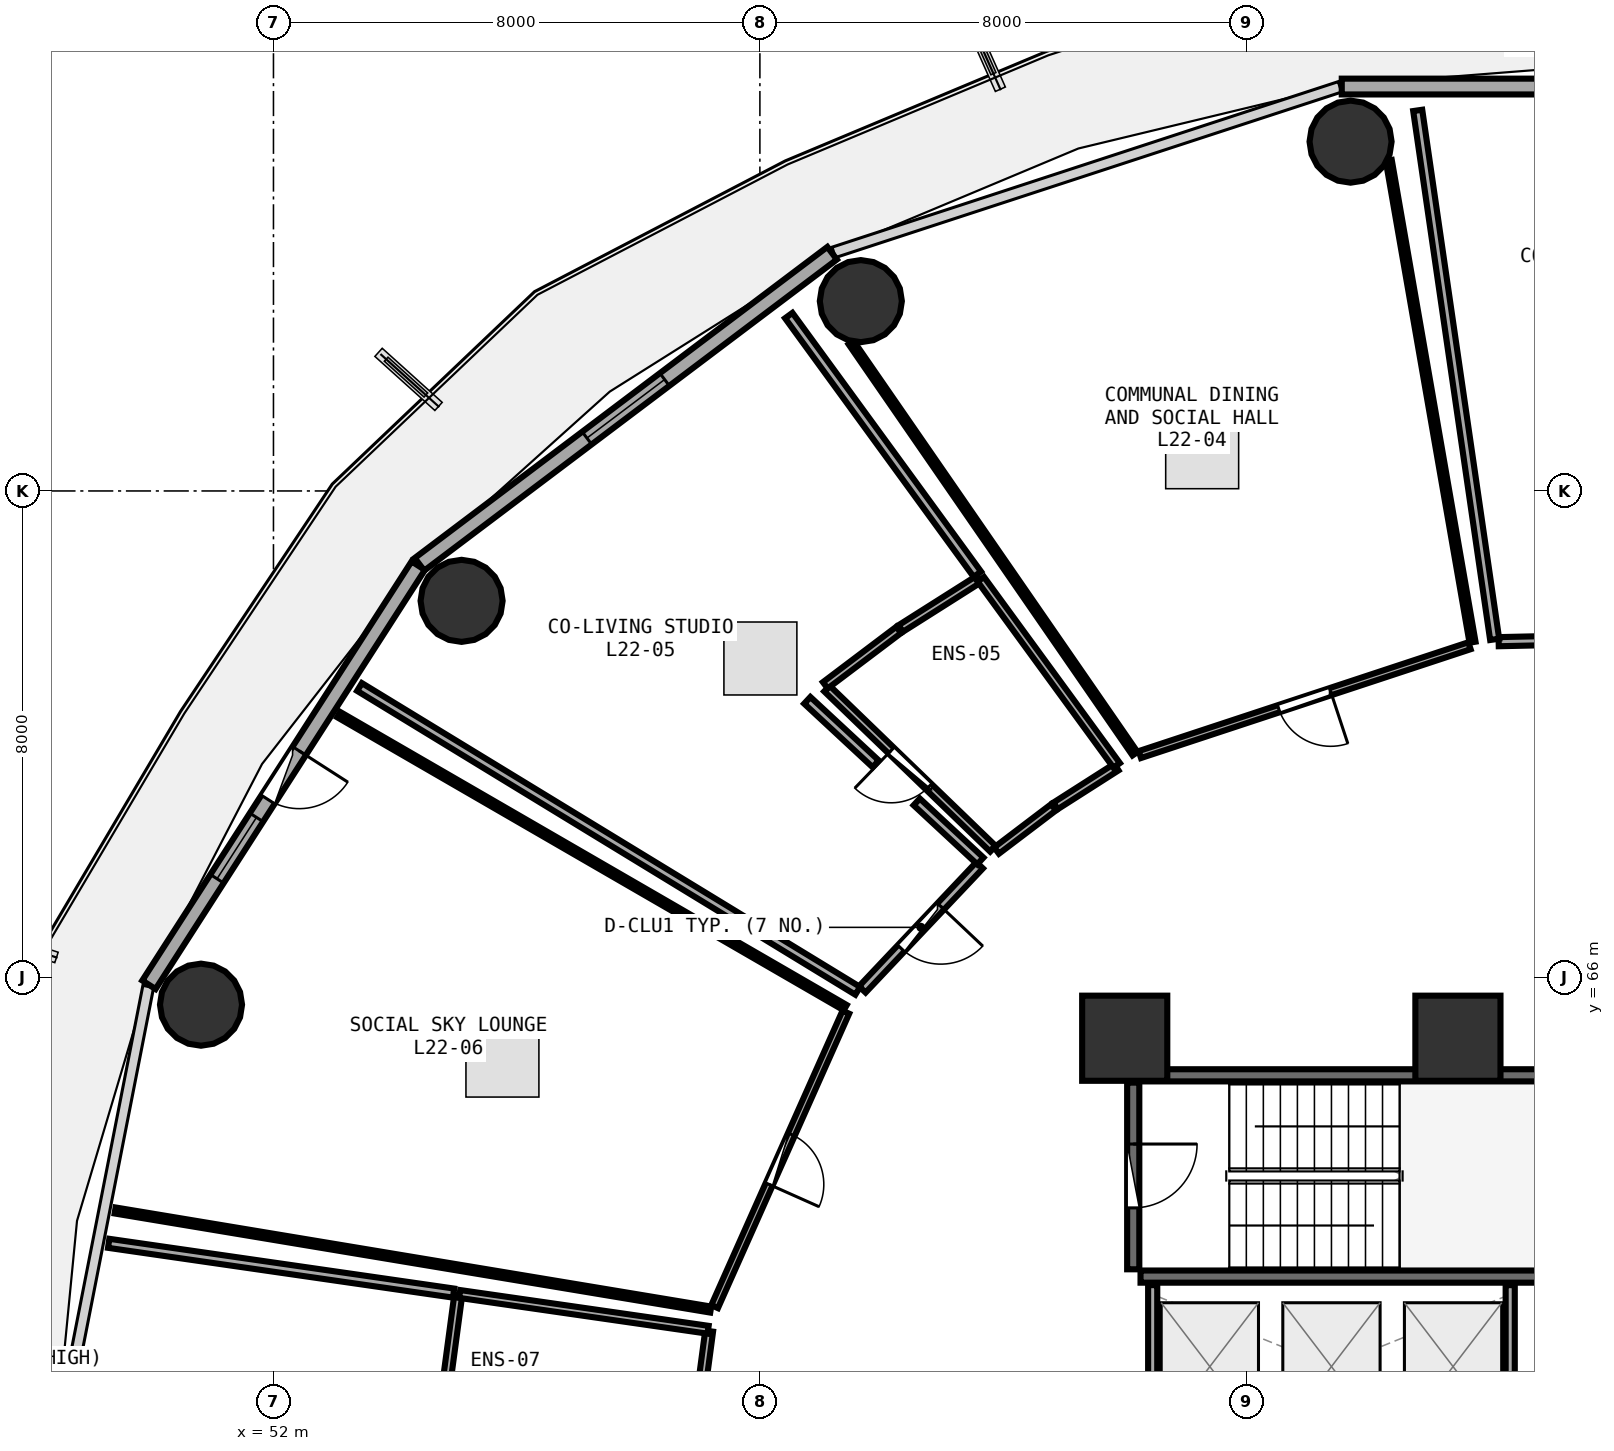
"""IFC4 building model, lengths in metres.
Left out: names, types, materials, properties, quantities, classifications, styles, units other than length and angle.
Written with IfcOpenShell. Run it as: python <this file> out.ifc"""

import sys

from ifc_helpers import new_model, si_unit, direction, frame, frame_2d, origin, origin_2d, place, context, subcontext, project, spatial, rectangle, circle, extrude, element, fill, save


model = new_model("IFC4")
c1 = context("Model", 3, precision=1e-05, world=origin(), true_north=direction((0.0, 1.0)))
c2 = subcontext(c1, "Body", "Model", "MODEL_VIEW")
j1 = project(units=[si_unit("LENGTHUNIT", "METRE"), si_unit("PLANEANGLEUNIT", "RADIAN")], contexts=[c1])
p1 = place(None, origin())
s1 = spatial("IfcSite", under=j1, at=p1, CompositionType="ELEMENT")
p2 = place(p1, origin())
s2 = spatial("IfcBuilding", under=s1, at=p2, CompositionType="ELEMENT")
p3 = place(p2, frame((0.0, 0.0, 87.6)))
s3 = spatial("IfcBuildingStorey", under=s2, at=p3, CompositionType="ELEMENT", Elevation=87.6)
for number, where, z_axis, x_axis in (
    (1, (71.48, 65.0, 0.0), (0.0, 0.0, 1.0), (1.0, 0.0, 0.0)),
    (2, (66.0, 65.0, 0.0), (0.0, 0.0, 1.0), (1.0, 0.0, 0.0)),
):
    element("IfcColumn", number, at=place(p3, frame(where, z_axis=z_axis, x_axis=x_axis)), inside=s3, PredefinedType="PILASTER", context=c2, shape_type="SweptSolid", body=[
        extrude(rectangle(XDim=1.4, YDim=1.4, at=origin_2d()), origin(), (0.0, 0.0, 1.0), 3.75),
    ])
for number, where, z_axis, x_axis in (
    (3, (69.714, 79.745, 0.0), (0.0, 0.0, 1.0), (1.0, 0.0, 0.0)),
    (4, (61.66, 77.122, 0.0), (0.0, 0.0, 1.0), (1.0, 0.0, 0.0)),
    (5, (55.094, 72.193, 0.0), (0.0, 0.0, 1.0), (1.0, 0.0, 0.0)),
    (6, (50.808, 65.552, 0.0), (0.0, 0.0, 1.0), (1.0, 0.0, 0.0)),
):
    element("IfcColumn", number, at=place(p3, frame(where, z_axis=z_axis, x_axis=x_axis)), inside=s3, PredefinedType="COLUMN", context=c2, shape_type="SweptSolid", body=[
        extrude(circle(Radius=0.675, at=origin_2d()), origin(), (0.0, 0.0, 1.0), 3.75),
    ])
p4 = place(p3, frame((78.43, 80.651, 0.0), z_axis=(0.0, 0.0, 1.0), x_axis=(-1.0, 0.0, 0.0)))
e7 = element("IfcWall", 7, at=p4, inside=s3, PredefinedType="SOLIDWALL", context=c2, shape_type="SweptSolid", body=[
    extrude(rectangle(XDim=8.861, YDim=0.26, at=frame_2d((4.43, 0.0))), origin(), (0.0, 0.0, 1.0), 3.475),
])
p5 = place(p4, frame((3.63, 0.0, 0.85)))
e8 = element("IfcOpeningElement", 8, at=p5, cuts=e7, PredefinedType="OPENING", context=c2, shape_type="SweptSolid", body=[
    extrude(rectangle(XDim=1.6, YDim=1.45, at=frame_2d((0.8, 0.725))), frame((0.0, 0.14, 0.0), z_axis=(0.0, -1.0, 0.0), x_axis=(1.0, 0.0, 0.0)), (0.0, 0.0, 1.0), 0.28),
])
p6 = place(p3, frame((61.188, 77.91, 0.0), z_axis=(0.0, 0.0, 1.0), x_axis=(-0.798501507879, -0.601992808857, 0.0)))
e9 = element("IfcWall", 9, at=p6, inside=s3, PredefinedType="SOLIDWALL", context=c2, shape_type="SweptSolid", body=[
    extrude(rectangle(XDim=8.499, YDim=0.26, at=frame_2d((4.25, 0.0))), origin(), (0.0, 0.0, 1.0), 3.475),
])
p7 = place(p6, frame((3.45, 0.0, 0.85)))
e10 = element("IfcOpeningElement", 10, at=p7, cuts=e9, PredefinedType="OPENING", context=c2, shape_type="SweptSolid", body=[
    extrude(rectangle(XDim=1.6, YDim=1.45, at=frame_2d((0.8, 0.725))), frame((0.0, 0.14, 0.0), z_axis=(0.0, -1.0, 0.0), x_axis=(1.0, 0.0, 0.0)), (0.0, 0.0, 1.0), 0.28),
])
p8 = place(p3, frame((54.381, 72.771, 0.0), z_axis=(0.0, 0.0, 1.0), x_axis=(-0.540620528459, -0.841266571432, 0.0)))
e11 = element("IfcWall", 11, at=p8, inside=s3, PredefinedType="SOLIDWALL", context=c2, shape_type="SweptSolid", body=[
    extrude(rectangle(XDim=8.193, YDim=0.26, at=frame_2d((4.096, 0.0))), origin(), (0.0, 0.0, 1.0), 3.475),
])
p9 = place(p8, frame((3.621, 0.0, 0.0)))
e12 = element("IfcOpeningElement", 12, at=p9, cuts=e11, PredefinedType="OPENING", context=c2, shape_type="SweptSolid", body=[
    extrude(rectangle(XDim=0.95, YDim=2.1, at=frame_2d((0.475, 1.05))), frame((0.0, 0.14, 0.0), z_axis=(0.0, -1.0, 0.0), x_axis=(1.0, 0.0, 0.0)), (0.0, 0.0, 1.0), 0.28),
])
p10 = place(p8, frame((4.921, 0.0, 0.85)))
e13 = element("IfcOpeningElement", 13, at=p10, cuts=e11, PredefinedType="OPENING", context=c2, shape_type="SweptSolid", body=[
    extrude(rectangle(XDim=1.2, YDim=1.45, at=frame_2d((0.6, 0.725))), frame((0.0, 0.14, 0.0), z_axis=(0.0, -1.0, 0.0), x_axis=(1.0, 0.0, 0.0)), (0.0, 0.0, 1.0), 0.28),
])
for number, where, z_axis, x_axis in (
    (14, (66.26, 61.08, 0.0), (0.0, 0.0, 1.0), (1.0, 0.0, 0.0)),
    (15, (73.42, 64.39, 0.0), (0.0, 0.0, 1.0), (-1.0, 0.0, 0.0)),
):
    element("IfcWall", number, at=place(p3, frame(where, z_axis=z_axis, x_axis=x_axis)), inside=s3, PredefinedType="SHEAR", context=c2, shape_type="SweptSolid", body=[
        extrude(rectangle(XDim=7.16, YDim=0.2, at=frame_2d((3.58, 0.0))), origin(), (0.0, 0.0, 1.0), 3.49),
    ])
p11 = place(p3, frame((66.14, 64.27, 0.0), z_axis=(0.0, 0.0, 1.0), x_axis=(0.0, -1.0, 0.0)))
e16 = element("IfcWall", 16, at=p11, inside=s3, PredefinedType="SHEAR", context=c2, shape_type="SweptSolid", body=[
    extrude(rectangle(XDim=3.07, YDim=0.2, at=frame_2d((1.535, 0.0))), origin(), (0.0, 0.0, 1.0), 3.49),
])
p12 = place(p11, frame((1.01, 0.0, 0.0)))
e17 = element("IfcOpeningElement", 17, at=p12, cuts=e16, PredefinedType="OPENING", context=c2, shape_type="SweptSolid", body=[
    extrude(rectangle(XDim=1.05, YDim=2.1, at=frame_2d((0.525, 1.05))), frame((0.0, 0.11, 0.0), z_axis=(0.0, -1.0, 0.0), x_axis=(1.0, 0.0, 0.0)), (0.0, 0.0, 1.0), 0.22),
])
for number, where, z_axis, x_axis in (
    (18, (66.46, 58.48, 0.0), (0.0, 0.0, 1.0), (0.0, 1.0, 0.0)),
    (19, (72.34, 58.48, 0.0), (0.0, 0.0, 1.0), (0.0, 1.0, 0.0)),
):
    element("IfcWall", number, at=place(p3, frame(where, z_axis=z_axis, x_axis=x_axis)), inside=s3, PredefinedType="PARTITIONING", context=c2, shape_type="SweptSolid", body=[
        extrude(rectangle(XDim=2.46, YDim=0.15, at=frame_2d((1.23, 0.0))), origin(), (0.0, 0.0, 1.0), 3.48),
    ])
p13 = place(p3, frame((75.121, 71.587, 0.0), z_axis=(0.0, 0.0, 1.0), x_axis=(-0.999757617916, -0.022016026426, 0.0)))
e20 = element("IfcWall", 20, at=p13, inside=s3, PredefinedType="PARTITIONING", context=c2, shape_type="SweptSolid", body=[
    extrude(rectangle(XDim=2.972, YDim=0.15, at=frame_2d((1.486, 0.0))), origin(), (0.0, 0.0, 1.0), 3.48),
])
p14 = place(p13, frame((1.011, 0.0, 0.0)))
e21 = element("IfcOpeningElement", 21, at=p14, cuts=e20, PredefinedType="OPENING", context=c2, shape_type="SweptSolid", body=[
    extrude(rectangle(XDim=0.95, YDim=2.08, at=frame_2d((0.475, 1.04))), frame((0.0, 0.085, 0.0), z_axis=(0.0, -1.0, 0.0), x_axis=(1.0, 0.0, 0.0)), (0.0, 0.0, 1.0), 0.17),
])
p15 = place(p3, frame((71.67, 71.454, 0.0), z_axis=(0.0, 0.0, 1.0), x_axis=(-0.949607265123, -0.313442246716, 0.0)))
e22 = element("IfcWall", 22, at=p15, inside=s3, PredefinedType="PARTITIONING", context=c2, shape_type="SweptSolid", body=[
    extrude(rectangle(XDim=5.708, YDim=0.12, at=frame_2d((2.854, 0.0))), origin(), (0.0, 0.0, 1.0), 2.925),
])
p16 = place(p15, frame((2.404, 0.0, 0.0)))
e23 = element("IfcOpeningElement", 23, at=p16, cuts=e22, PredefinedType="OPENING", context=c2, shape_type="SweptSolid", body=[
    extrude(rectangle(XDim=0.9, YDim=2.08, at=frame_2d((0.45, 1.04))), frame((0.0, 0.07, 0.0), z_axis=(0.0, -1.0, 0.0), x_axis=(1.0, 0.0, 0.0)), (0.0, 0.0, 1.0), 0.14),
])
p17 = place(p3, frame((63.833, 68.116, 0.0), z_axis=(0.0, 0.0, 1.0), x_axis=(-0.719513452588, 0.694478503299, 0.0)))
e24 = element("IfcWall", 24, at=p17, inside=s3, PredefinedType="PLUMBINGWALL", context=c2, shape_type="SweptSolid", body=[
    extrude(rectangle(XDim=3.793, YDim=0.13, at=frame_2d((1.897, 0.0))), origin(), (0.0, 0.0, 1.0), 3.175),
])
p18 = place(p17, frame((1.467, 0.0, 0.0)))
e25 = element("IfcOpeningElement", 25, at=p18, cuts=e24, PredefinedType="OPENING", context=c2, shape_type="SweptSolid", body=[
    extrude(rectangle(XDim=0.86, YDim=2.05, at=frame_2d((0.43, 1.025))), frame((0.0, 0.075, 0.0), z_axis=(0.0, -1.0, 0.0), x_axis=(1.0, 0.0, 0.0)), (0.0, 0.0, 1.0), 0.15),
])
p19 = place(p3, frame((63.614, 67.844, 0.0), z_axis=(0.0, 0.0, 1.0), x_axis=(-0.68683784084, -0.726810690889, 0.0)))
e26 = element("IfcWall", 26, at=p19, inside=s3, PredefinedType="PARTITIONING", context=c2, shape_type="SweptSolid", body=[
    extrude(rectangle(XDim=2.81, YDim=0.15, at=frame_2d((1.405, 0.0))), origin(), (0.0, 0.0, 1.0), 2.925),
])
p20 = place(p19, frame((0.93, 0.0, 0.0)))
e27 = element("IfcOpeningElement", 27, at=p20, cuts=e26, PredefinedType="OPENING", context=c2, shape_type="SweptSolid", body=[
    extrude(rectangle(XDim=0.95, YDim=2.08, at=frame_2d((0.475, 1.04))), frame((0.0, 0.085, 0.0), z_axis=(0.0, -1.0, 0.0), x_axis=(1.0, 0.0, 0.0)), (0.0, 0.0, 1.0), 0.17),
])
p21 = place(p3, frame((61.414, 65.428, 0.0), z_axis=(0.0, 0.0, 1.0), x_axis=(-0.407078232177, -0.913393295841, 0.0)))
e28 = element("IfcWall", 28, at=p21, inside=s3, PredefinedType="PARTITIONING", context=c2, shape_type="SweptSolid", body=[
    extrude(rectangle(XDim=5.302, YDim=0.12, at=frame_2d((2.651, 0.0))), origin(), (0.0, 0.0, 1.0), 2.925),
])
p22 = place(p21, frame((2.201, 0.0, 0.0)))
e29 = element("IfcOpeningElement", 29, at=p22, cuts=e28, PredefinedType="OPENING", context=c2, shape_type="SweptSolid", body=[
    extrude(rectangle(XDim=0.9, YDim=2.08, at=frame_2d((0.45, 1.04))), frame((0.0, 0.07, 0.0), z_axis=(0.0, -1.0, 0.0), x_axis=(1.0, 0.0, 0.0)), (0.0, 0.0, 1.0), 0.14),
])
p23 = place(p3, frame((72.084, 71.56, 0.0), z_axis=(0.0, 0.0, 1.0), x_axis=(-0.143952208647, 0.989584640961, 0.0)))
e30 = element("IfcWall", 30, at=p23, inside=s3, PredefinedType="PARTITIONING", context=c2, shape_type="SweptSolid", body=[
    extrude(rectangle(XDim=8.79, YDim=0.15, at=frame_2d((4.395, 0.0))), origin(), (0.0, 0.0, 1.0), 2.975),
])
p24 = place(p3, frame((66.169, 69.679, 0.0), z_axis=(0.0, 0.0, 1.0), x_axis=(-0.568250117639, 0.822855882766, 0.0)))
e31 = element("IfcWall", 31, at=p24, inside=s3, PredefinedType="PARTITIONING", context=c2, shape_type="SweptSolid", body=[
    extrude(rectangle(XDim=8.217, YDim=0.1, at=frame_2d((4.108, 0.0))), origin(), (0.0, 0.0, 1.0), 2.925),
])
p25 = place(p3, frame((70.343, 79.436, 0.0), z_axis=(0.0, 0.0, 1.0), x_axis=(0.171306583965, -0.985217769983, 0.0)))
e32 = element("IfcWall", 32, at=p25, inside=s3, PredefinedType="PARTITIONING", context=c2, shape_type="SweptSolid", body=[
    extrude(rectangle(XDim=8.042, YDim=0.1, at=frame_2d((4.021, 0.0))), origin(), (0.0, 0.0, 1.0), 3.175),
])
p26 = place(p3, frame((65.863, 69.459, 0.0), z_axis=(0.0, 0.0, 1.0), x_axis=(-0.842932135958, -0.538019901276, 0.0)))
e33 = element("IfcWall", 33, at=p26, inside=s3, PredefinedType="PLUMBINGWALL", context=c2, shape_type="SweptSolid", body=[
    extrude(rectangle(XDim=1.187, YDim=0.13, at=frame_2d((0.593, 0.0))), origin(), (0.0, 0.0, 1.0), 3.48),
])
p27 = place(p3, frame((64.83, 68.798, 0.0), z_axis=(0.0, 0.0, 1.0), x_axis=(-0.796729134499, -0.604336567022, 0.0)))
e34 = element("IfcWall", 34, at=p27, inside=s3, PredefinedType="PLUMBINGWALL", context=c2, shape_type="SweptSolid", body=[
    extrude(rectangle(XDim=1.177, YDim=0.13, at=frame_2d((0.589, 0.0))), origin(), (0.0, 0.0, 1.0), 2.925),
])
p28 = place(p3, frame((61.076, 70.804, 0.0), z_axis=(0.0, 0.0, 1.0), x_axis=(0.798136421733, 0.602476764949, 0.0)))
e35 = element("IfcWall", 35, at=p28, inside=s3, PredefinedType="PLUMBINGWALL", context=c2, shape_type="SweptSolid", body=[
    extrude(rectangle(XDim=1.512, YDim=0.13, at=frame_2d((0.756, 0.0))), origin(), (0.0, 0.0, 1.0), 3.48),
])
p29 = place(p3, frame((62.316, 71.738, 0.0), z_axis=(0.0, 0.0, 1.0), x_axis=(0.844925229622, 0.534884432703, 0.0)))
e36 = element("IfcWall", 36, at=p29, inside=s3, PredefinedType="PLUMBINGWALL", context=c2, shape_type="SweptSolid", body=[
    extrude(rectangle(XDim=1.524, YDim=0.13, at=frame_2d((0.762, 0.0))), origin(), (0.0, 0.0, 1.0), 2.925),
])
p30 = place(p3, frame((63.633, 72.548, 0.0), z_axis=(0.0, 0.0, 1.0), x_axis=(0.589656455867, -0.807654173551, 0.0)))
e37 = element("IfcWall", 37, at=p30, inside=s3, PredefinedType="PLUMBINGWALL", context=c2, shape_type="SweptSolid", body=[
    extrude(rectangle(XDim=3.791, YDim=0.13, at=frame_2d((1.896, 0.0))), origin(), (0.0, 0.0, 1.0), 3.175),
])
p31 = place(p3, frame((61.609, 65.78, 0.0), z_axis=(0.0, 0.0, 1.0), x_axis=(-0.853785143599, 0.520625516634, 0.0)))
e38 = element("IfcWall", 38, at=p31, inside=s3, PredefinedType="PARTITIONING", context=c2, shape_type="SweptSolid", body=[
    extrude(rectangle(XDim=9.597, YDim=0.15, at=frame_2d((4.798, 0.0))), origin(), (0.0, 0.0, 1.0), 2.975),
])
p32 = place(p3, frame((60.475, 76.885, 0.0), z_axis=(0.0, 0.0, 1.0), x_axis=(0.589128007392, -0.808039721119, 0.0)))
e39 = element("IfcWall", 39, at=p32, inside=s3, PredefinedType="PARTITIONING", context=c2, shape_type="SweptSolid", body=[
    extrude(rectangle(XDim=5.265, YDim=0.15, at=frame_2d((2.633, 0.0))), origin(), (0.0, 0.0, 1.0), 2.925),
])
p33 = place(p3, frame((60.779, 70.557, 0.0), z_axis=(0.0, 0.0, 1.0), x_axis=(0.732929378099, -0.680304730778, 0.0)))
e40 = element("IfcWall", 40, at=p33, inside=s3, PredefinedType="PARTITIONING", context=c2, shape_type="SweptSolid", body=[
    extrude(rectangle(XDim=1.536, YDim=0.15, at=frame_2d((0.768, 0.0))), origin(), (0.0, 0.0, 1.0), 3.175),
])
p34 = place(p3, frame((62.579, 68.886, 0.0), z_axis=(0.0, 0.0, 1.0), x_axis=(0.733037104662, -0.680188652646, 0.0)))
e41 = element("IfcWall", 41, at=p34, inside=s3, PredefinedType="PARTITIONING", context=c2, shape_type="SweptSolid", body=[
    extrude(rectangle(XDim=1.427, YDim=0.15, at=frame_2d((0.714, 0.0))), origin(), (0.0, 0.0, 1.0), 3.235),
])
p35 = place(p3, frame((59.191, 60.538, 0.0), z_axis=(0.0, 0.0, 1.0), x_axis=(-0.986439069388, 0.16412788424, 0.0)))
e42 = element("IfcWall", 42, at=p35, inside=s3, PredefinedType="PARTITIONING", context=c2, shape_type="SweptSolid", body=[
    extrude(rectangle(XDim=9.931, YDim=0.1, at=frame_2d((4.965, 0.0))), origin(), (0.0, 0.0, 1.0), 2.975),
])
p36 = place(p3, frame((53.073, 70.322, 0.0), z_axis=(0.0, 0.0, 1.0), x_axis=(0.865606852524, -0.500724252322, 0.0)))
e43 = element("IfcWall", 43, at=p36, inside=s3, PredefinedType="PARTITIONING", context=c2, shape_type="SweptSolid", body=[
    extrude(rectangle(XDim=9.624, YDim=0.1, at=frame_2d((4.812, 0.0))), origin(), (0.0, 0.0, 1.0), 2.975),
])
p37 = place(p3, frame((59.165, 60.183, 0.0), z_axis=(0.0, 0.0, 1.0), x_axis=(-0.132293485363, -0.991210590001, 0.0)))
e44 = element("IfcWall", 44, at=p37, inside=s3, PredefinedType="PLUMBINGWALL", context=c2, shape_type="SweptSolid", body=[
    extrude(rectangle(XDim=1.109, YDim=0.13, at=frame_2d((0.555, 0.0))), origin(), (0.0, 0.0, 1.0), 3.48),
])
p38 = place(p3, frame((54.851, 59.371, 0.0), z_axis=(0.0, 0.0, 1.0), x_axis=(0.133008986947, 0.991114831587, 0.0)))
e45 = element("IfcWall", 45, at=p38, inside=s3, PredefinedType="PLUMBINGWALL", context=c2, shape_type="SweptSolid", body=[
    extrude(rectangle(XDim=1.419, YDim=0.13, at=frame_2d((0.709, 0.0))), origin(), (0.0, 0.0, 1.0), 3.48),
])
p39 = place(p3, frame((55.062, 60.794, 0.0), z_axis=(0.0, 0.0, 1.0), x_axis=(0.989792775484, -0.142514075094, 0.0)))
e46 = element("IfcWall", 46, at=p39, inside=s3, PredefinedType="PLUMBINGWALL", context=c2, shape_type="SweptSolid", body=[
    extrude(rectangle(XDim=4.129, YDim=0.13, at=frame_2d((2.064, 0.0))), origin(), (0.0, 0.0, 1.0), 3.175),
])
p40 = place(p3, frame((49.29, 61.627, 0.0), z_axis=(0.0, 0.0, 1.0), x_axis=(0.989748303042, -0.142822605444, 0.0)))
e47 = element("IfcWall", 47, at=p40, inside=s3, PredefinedType="PARTITIONING", context=c2, shape_type="SweptSolid", body=[
    extrude(rectangle(XDim=5.732, YDim=0.15, at=frame_2d((2.866, 0.0))), origin(), (0.0, 0.0, 1.0), 2.975),
])
p41 = place(p7, origin())
e48 = element("IfcWindow", 48, at=p41, inside=s3, PartitioningType="SINGLE_PANEL", PredefinedType="WINDOW", context=c2, shape_type="SweptSolid", body=[
    extrude(rectangle(XDim=1.6, YDim=1.45, at=frame_2d((0.8, 0.725))), frame((0.0, 0.03, 0.0), z_axis=(0.0, -1.0, 0.0), x_axis=(1.0, 0.0, 0.0)), (0.0, 0.0, 1.0), 0.06),
])
fill(e10, e48)
p42 = place(p9, frame((0.95, 0.0, 0.0), z_axis=(0.0, 0.0, 1.0), x_axis=(-1.0, 0.0, 0.0)))
e49 = element("IfcDoor", 49, at=p42, inside=s3, OperationType="SINGLE_SWING_RIGHT", PredefinedType="DOOR", context=c2, shape_type="SweptSolid", body=[
    extrude(rectangle(XDim=0.95, YDim=2.1, at=frame_2d((0.475, 1.05))), frame((0.0, 0.025, 0.0), z_axis=(0.0, -1.0, 0.0), x_axis=(1.0, 0.0, 0.0)), (0.0, 0.0, 1.0), 0.05),
])
fill(e12, e49)
p43 = place(p10, origin())
e50 = element("IfcWindow", 50, at=p43, inside=s3, PartitioningType="SINGLE_PANEL", PredefinedType="WINDOW", context=c2, shape_type="SweptSolid", body=[
    extrude(rectangle(XDim=1.2, YDim=1.45, at=frame_2d((0.6, 0.725))), frame((0.0, 0.03, 0.0), z_axis=(0.0, -1.0, 0.0), x_axis=(1.0, 0.0, 0.0)), (0.0, 0.0, 1.0), 0.06),
])
fill(e13, e50)
p44 = place(p12, origin())
e51 = element("IfcDoor", 51, at=p44, inside=s3, OperationType="SINGLE_SWING_LEFT", PredefinedType="DOOR", context=c2, shape_type="SweptSolid", body=[
    extrude(rectangle(XDim=1.05, YDim=2.1, at=frame_2d((0.525, 1.05))), frame((0.0, 0.025, 0.0), z_axis=(0.0, -1.0, 0.0), x_axis=(1.0, 0.0, 0.0)), (0.0, 0.0, 1.0), 0.05),
])
fill(e17, e51)
p45 = place(p16, origin())
e52 = element("IfcDoor", 52, at=p45, inside=s3, OperationType="SINGLE_SWING_LEFT", PredefinedType="DOOR", context=c2, shape_type="SweptSolid", body=[
    extrude(rectangle(XDim=0.9, YDim=2.08, at=frame_2d((0.45, 1.04))), frame((0.0, 0.025, 0.0), z_axis=(0.0, -1.0, 0.0), x_axis=(1.0, 0.0, 0.0)), (0.0, 0.0, 1.0), 0.05),
])
fill(e23, e52)
p46 = place(p18, origin())
e53 = element("IfcDoor", 53, at=p46, inside=s3, OperationType="SINGLE_SWING_RIGHT", PredefinedType="DOOR", context=c2, shape_type="SweptSolid", body=[
    extrude(rectangle(XDim=0.86, YDim=2.05, at=frame_2d((0.43, 1.025))), frame((0.0, 0.025, 0.0), z_axis=(0.0, -1.0, 0.0), x_axis=(1.0, 0.0, 0.0)), (0.0, 0.0, 1.0), 0.05),
])
fill(e25, e53)
p47 = place(p20, origin())
e54 = element("IfcDoor", 54, at=p47, inside=s3, OperationType="SINGLE_SWING_LEFT", PredefinedType="DOOR", context=c2, shape_type="SweptSolid", body=[
    extrude(rectangle(XDim=0.95, YDim=2.08, at=frame_2d((0.475, 1.04))), frame((0.0, 0.025, 0.0), z_axis=(0.0, -1.0, 0.0), x_axis=(1.0, 0.0, 0.0)), (0.0, 0.0, 1.0), 0.05),
])
fill(e27, e54)
p48 = place(p22, origin())
e55 = element("IfcDoor", 55, at=p48, inside=s3, OperationType="SINGLE_SWING_RIGHT", PredefinedType="DOOR", context=c2, shape_type="SweptSolid", body=[
    extrude(rectangle(XDim=0.9, YDim=2.08, at=frame_2d((0.45, 1.04))), frame((0.0, 0.025, 0.0), z_axis=(0.0, -1.0, 0.0), x_axis=(1.0, 0.0, 0.0)), (0.0, 0.0, 1.0), 0.05),
])
fill(e29, e55)
save(model, sys.argv[1])
